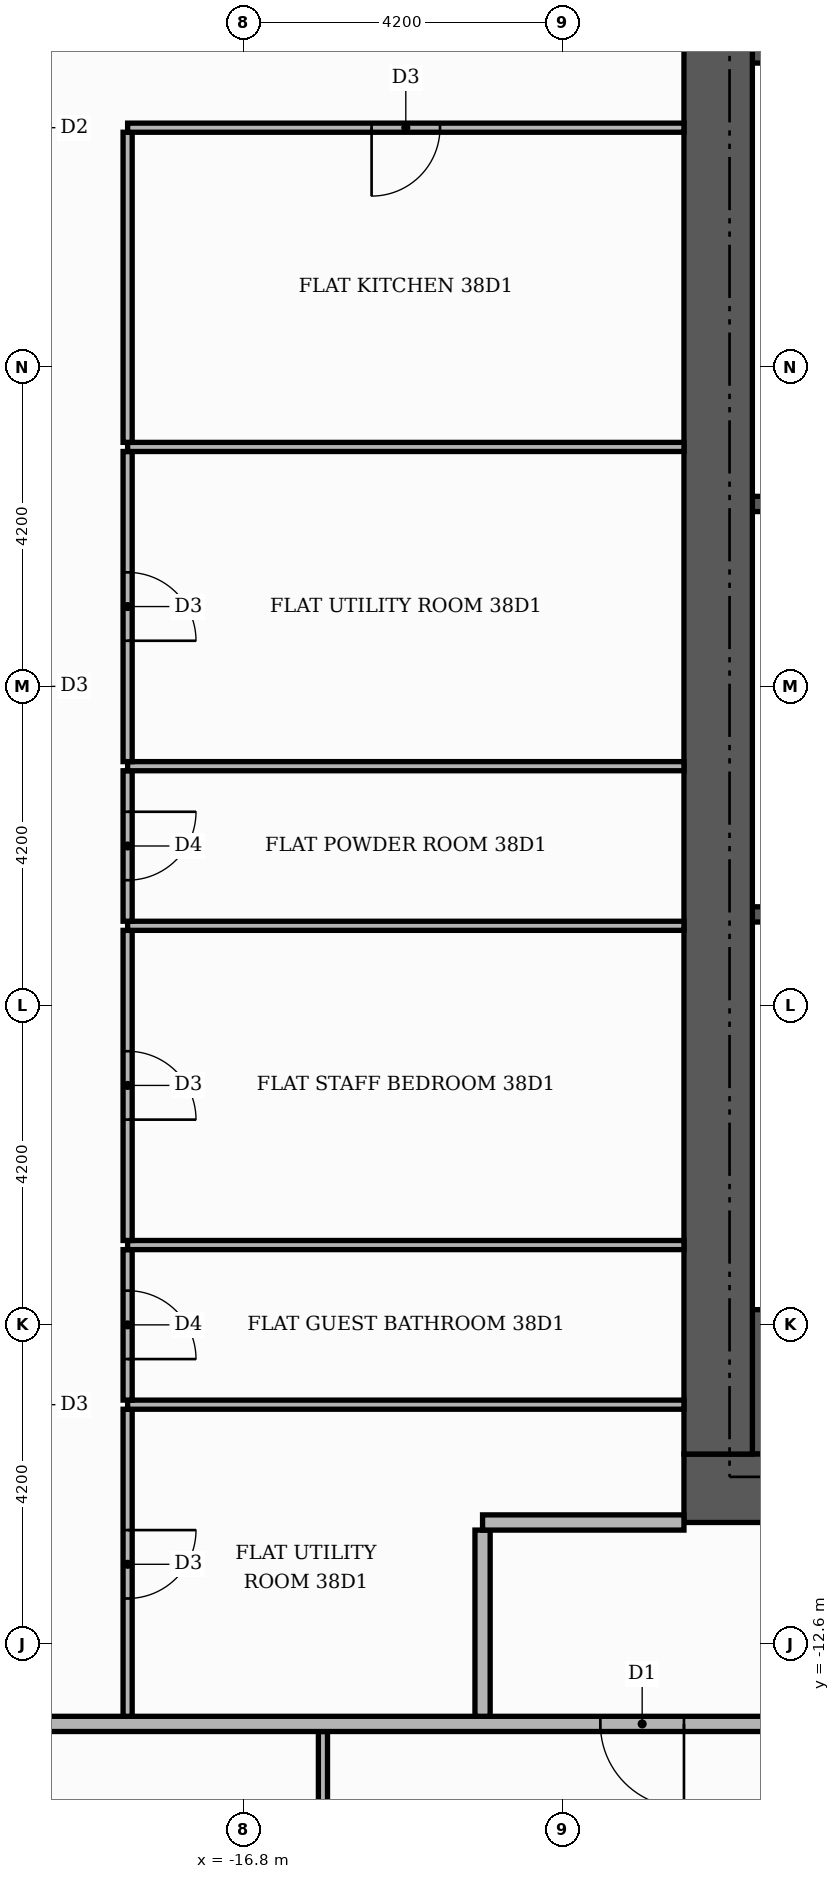
"""IFC4 building model, lengths in metres.
Left out: names, types, materials, properties, quantities, classifications, styles, units other than length and angle.
Written with IfcOpenShell. Run it as: python <this file> out.ifc"""

import sys

from ifc_helpers import new_model, si_unit, direction, frame, frame_2d, origin, place, context, subcontext, project, spatial, rectangle, extrude, element, fill, save


model = new_model("IFC4")
c1 = context("Model", 3, precision=1e-05, world=origin(), true_north=direction((0.0, 1.0)))
c2 = subcontext(c1, "Body", "Model", "MODEL_VIEW")
j1 = project(units=[si_unit("LENGTHUNIT", "METRE"), si_unit("PLANEANGLEUNIT", "RADIAN")], contexts=[c1])
p1 = place(None, origin())
s1 = spatial("IfcSite", under=j1, at=p1, CompositionType="ELEMENT")
p2 = place(p1, origin())
s2 = spatial("IfcBuilding", under=s1, at=p2, CompositionType="ELEMENT")
p3 = place(p2, frame((0.0, 0.0, 161.1)))
s3 = spatial("IfcBuildingStorey", under=s2, at=p3, CompositionType="ELEMENT", Elevation=161.1)
for number, where, z_axis, x_axis in (
    (1, (-10.1, -9.15, 0.0), (0.0, 0.0, 1.0), (1.0, 0.0, 0.0)),
    (2, (-10.1, 9.15, 0.0), (0.0, 0.0, 1.0), (1.0, 0.0, 0.0)),
):
    element("IfcWall", number, at=place(p3, frame(where, z_axis=z_axis, x_axis=x_axis)), inside=s3, PredefinedType="SHEAR", context=c2, shape_type="SweptSolid", body=[
        extrude(rectangle(XDim=4.6, YDim=1.9, at=frame_2d((2.3, 0.0))), origin(), (0.0, 0.0, 1.0), 3.48),
    ])
for number, where, z_axis, x_axis in (
    (3, (-10.1, -3.0, 0.0), (0.0, 0.0, 1.0), (1.0, 0.0, 0.0)),
    (4, (-10.1, 2.4, 0.0), (0.0, 0.0, 1.0), (1.0, 0.0, 0.0)),
):
    element("IfcWall", number, at=place(p3, frame(where, z_axis=z_axis, x_axis=x_axis)), inside=s3, PredefinedType="SHEAR", context=c2, shape_type="SweptSolid", body=[
        extrude(rectangle(XDim=0.9, YDim=0.2, at=frame_2d((0.45, 0.0))), origin(), (0.0, 0.0, 1.0), 3.48),
    ])
p4 = place(p3, frame((-11.0, -10.55, 0.0), z_axis=(0.0, 0.0, 1.0), x_axis=(1.0, 0.0, 0.0)))
e5 = element("IfcWall", 5, at=p4, inside=s3, PredefinedType="SHEAR", context=c2, shape_type="SweptSolid", body=[
    extrude(rectangle(XDim=22.0, YDim=0.9, at=frame_2d((11.0, 0.0))), origin(), (0.0, 0.0, 1.0), 3.48),
])
p5 = place(p4, frame((7.4, 0.0, 0.0)))
e6 = element("IfcOpeningElement", 6, at=p5, cuts=e5, PredefinedType="OPENING", context=c2, shape_type="SweptSolid", body=[
    extrude(rectangle(XDim=1.8, YDim=2.2, at=frame_2d((0.9, 1.1))), frame((0.0, 0.46, 0.0), z_axis=(0.0, -1.0, 0.0), x_axis=(1.0, 0.0, 0.0)), (0.0, 0.0, 1.0), 0.92),
])
p6 = place(p3, frame((-10.55, -10.1, 0.0), z_axis=(0.0, 0.0, 1.0), x_axis=(0.0, 1.0, 0.0)))
e7 = element("IfcWall", 7, at=p6, inside=s3, PredefinedType="SHEAR", context=c2, shape_type="SweptSolid", body=[
    extrude(rectangle(XDim=20.2, YDim=0.9, at=frame_2d((10.1, 0.0))), origin(), (0.0, 0.0, 1.0), 3.48),
])
p7 = place(p3, frame((-15.75, -20.06, 0.0), z_axis=(0.0, 0.0, 1.0), x_axis=(0.0, 1.0, 0.0)))
e8 = element("IfcWall", 8, at=p7, inside=s3, PredefinedType="PARTITIONING", context=c2, shape_type="SweptSolid", body=[
    extrude(rectangle(XDim=6.31, YDim=0.12, at=frame_2d((3.155, 0.0))), origin(), (0.0, 0.0, 1.0), 3.48),
])
p8 = place(p7, frame((2.675, 0.0, 0.0)))
e9 = element("IfcOpeningElement", 9, at=p8, cuts=e8, PredefinedType="OPENING", context=c2, shape_type="SweptSolid", body=[
    extrude(rectangle(XDim=1.0, YDim=2.1, at=frame_2d((0.5, 1.05))), frame((0.0, 0.07, 0.0), z_axis=(0.0, -1.0, 0.0), x_axis=(1.0, 0.0, 0.0)), (0.0, 0.0, 1.0), 0.14),
])
p9 = place(p3, frame((-25.42, -13.65, 0.0), z_axis=(0.0, 0.0, 1.0), x_axis=(1.0, 0.0, 0.0)))
e10 = element("IfcWall", 10, at=p9, inside=s3, PredefinedType="PARTITIONING", context=c2, shape_type="SweptSolid", body=[
    extrude(rectangle(XDim=39.07, YDim=0.2, at=frame_2d((19.535, 0.0))), origin(), (0.0, 0.0, 1.0), 3.48),
])
p10 = place(p9, frame((13.32, 0.0, 0.0)))
e11 = element("IfcOpeningElement", 11, at=p10, cuts=e10, PredefinedType="OPENING", context=c2, shape_type="SweptSolid", body=[
    extrude(rectangle(XDim=1.1, YDim=2.4, at=frame_2d((0.55, 1.2))), frame((0.0, 0.11, 0.0), z_axis=(0.0, -1.0, 0.0), x_axis=(1.0, 0.0, 0.0)), (0.0, 0.0, 1.0), 0.22),
])
p11 = place(p9, frame((21.72, 0.0, 0.0)))
e12 = element("IfcOpeningElement", 12, at=p11, cuts=e10, PredefinedType="OPENING", context=c2, shape_type="SweptSolid", body=[
    extrude(rectangle(XDim=1.1, YDim=2.4, at=frame_2d((0.55, 1.2))), frame((0.0, 0.11, 0.0), z_axis=(0.0, -1.0, 0.0), x_axis=(1.0, 0.0, 0.0)), (0.0, 0.0, 1.0), 0.22),
])
p12 = place(p3, frame((-18.32, -13.55, 0.0), z_axis=(0.0, 0.0, 1.0), x_axis=(0.0, 1.0, 0.0)))
e13 = element("IfcWall", 13, at=p12, inside=s3, PredefinedType="PARTITIONING", context=c2, shape_type="SweptSolid", body=[
    extrude(rectangle(XDim=4.04, YDim=0.12, at=frame_2d((2.02, 0.0))), origin(), (0.0, 0.0, 1.0), 3.48),
])
p13 = place(p12, frame((1.55, 0.0, 0.0)))
e14 = element("IfcOpeningElement", 14, at=p13, cuts=e13, PredefinedType="OPENING", context=c2, shape_type="SweptSolid", body=[
    extrude(rectangle(XDim=0.9, YDim=2.1, at=frame_2d((0.45, 1.05))), frame((0.0, 0.07, 0.0), z_axis=(0.0, -1.0, 0.0), x_axis=(1.0, 0.0, 0.0)), (0.0, 0.0, 1.0), 0.14),
])
p14 = place(p3, frame((-13.65, -13.55, 0.0), z_axis=(0.0, 0.0, 1.0), x_axis=(0.0, 1.0, 0.0)))
e15 = element("IfcWall", 15, at=p14, inside=s3, PredefinedType="PARTITIONING", context=c2, shape_type="SweptSolid", body=[
    extrude(rectangle(XDim=2.45, YDim=0.2, at=frame_2d((1.225, 0.0))), origin(), (0.0, 0.0, 1.0), 3.48),
])
p15 = place(p3, frame((-13.65, -11.0, 0.0), z_axis=(0.0, 0.0, 1.0), x_axis=(1.0, 0.0, 0.0)))
e16 = element("IfcWall", 16, at=p15, inside=s3, PredefinedType="PARTITIONING", context=c2, shape_type="SweptSolid", body=[
    extrude(rectangle(XDim=2.65, YDim=0.2, at=frame_2d((1.325, 0.0))), origin(), (0.0, 0.0, 1.0), 3.48),
])
p16 = place(p3, frame((-18.32, -9.45, 0.0), z_axis=(0.0, 0.0, 1.0), x_axis=(1.0, 0.0, 0.0)))
e17 = element("IfcWall", 17, at=p16, inside=s3, PredefinedType="PARTITIONING", context=c2, shape_type="SweptSolid", body=[
    extrude(rectangle(XDim=7.32, YDim=0.12, at=frame_2d((3.66, 0.0))), origin(), (0.0, 0.0, 1.0), 3.48),
])
p17 = place(p3, frame((-18.32, -9.39, 0.0), z_axis=(0.0, 0.0, 1.0), x_axis=(0.0, 1.0, 0.0)))
e18 = element("IfcWall", 18, at=p17, inside=s3, PredefinedType="PARTITIONING", context=c2, shape_type="SweptSolid", body=[
    extrude(rectangle(XDim=1.98, YDim=0.12, at=frame_2d((0.99, 0.0))), origin(), (0.0, 0.0, 1.0), 3.48),
])
p18 = place(p17, frame((0.54, 0.0, 0.0)))
e19 = element("IfcOpeningElement", 19, at=p18, cuts=e18, PredefinedType="OPENING", context=c2, shape_type="SweptSolid", body=[
    extrude(rectangle(XDim=0.9, YDim=2.1, at=frame_2d((0.45, 1.05))), frame((0.0, 0.07, 0.0), z_axis=(0.0, -1.0, 0.0), x_axis=(1.0, 0.0, 0.0)), (0.0, 0.0, 1.0), 0.14),
])
p19 = place(p3, frame((-18.32, -7.35, 0.0), z_axis=(0.0, 0.0, 1.0), x_axis=(1.0, 0.0, 0.0)))
e20 = element("IfcWall", 20, at=p19, inside=s3, PredefinedType="PARTITIONING", context=c2, shape_type="SweptSolid", body=[
    extrude(rectangle(XDim=7.32, YDim=0.12, at=frame_2d((3.66, 0.0))), origin(), (0.0, 0.0, 1.0), 3.48),
])
p20 = place(p3, frame((-18.32, -7.29, 0.0), z_axis=(0.0, 0.0, 1.0), x_axis=(0.0, 1.0, 0.0)))
e21 = element("IfcWall", 21, at=p20, inside=s3, PredefinedType="PARTITIONING", context=c2, shape_type="SweptSolid", body=[
    extrude(rectangle(XDim=4.08, YDim=0.12, at=frame_2d((2.04, 0.0))), origin(), (0.0, 0.0, 1.0), 3.48),
])
p21 = place(p20, frame((1.59, 0.0, 0.0)))
e22 = element("IfcOpeningElement", 22, at=p21, cuts=e21, PredefinedType="OPENING", context=c2, shape_type="SweptSolid", body=[
    extrude(rectangle(XDim=0.9, YDim=2.1, at=frame_2d((0.45, 1.05))), frame((0.0, 0.07, 0.0), z_axis=(0.0, -1.0, 0.0), x_axis=(1.0, 0.0, 0.0)), (0.0, 0.0, 1.0), 0.14),
])
p22 = place(p3, frame((-18.32, -3.15, 0.0), z_axis=(0.0, 0.0, 1.0), x_axis=(1.0, 0.0, 0.0)))
e23 = element("IfcWall", 23, at=p22, inside=s3, PredefinedType="PARTITIONING", context=c2, shape_type="SweptSolid", body=[
    extrude(rectangle(XDim=7.32, YDim=0.12, at=frame_2d((3.66, 0.0))), origin(), (0.0, 0.0, 1.0), 3.48),
])
p23 = place(p3, frame((-18.32, -3.09, 0.0), z_axis=(0.0, 0.0, 1.0), x_axis=(0.0, 1.0, 0.0)))
e24 = element("IfcWall", 24, at=p23, inside=s3, PredefinedType="PARTITIONING", context=c2, shape_type="SweptSolid", body=[
    extrude(rectangle(XDim=1.98, YDim=0.12, at=frame_2d((0.99, 0.0))), origin(), (0.0, 0.0, 1.0), 3.48),
])
p24 = place(p23, frame((0.54, 0.0, 0.0)))
e25 = element("IfcOpeningElement", 25, at=p24, cuts=e24, PredefinedType="OPENING", context=c2, shape_type="SweptSolid", body=[
    extrude(rectangle(XDim=0.9, YDim=2.1, at=frame_2d((0.45, 1.05))), frame((0.0, 0.07, 0.0), z_axis=(0.0, -1.0, 0.0), x_axis=(1.0, 0.0, 0.0)), (0.0, 0.0, 1.0), 0.14),
])
p25 = place(p3, frame((-18.32, -1.05, 0.0), z_axis=(0.0, 0.0, 1.0), x_axis=(1.0, 0.0, 0.0)))
e26 = element("IfcWall", 26, at=p25, inside=s3, PredefinedType="PARTITIONING", context=c2, shape_type="SweptSolid", body=[
    extrude(rectangle(XDim=7.32, YDim=0.12, at=frame_2d((3.66, 0.0))), origin(), (0.0, 0.0, 1.0), 3.48),
])
p26 = place(p3, frame((-18.32, -0.99, 0.0), z_axis=(0.0, 0.0, 1.0), x_axis=(0.0, 1.0, 0.0)))
e27 = element("IfcWall", 27, at=p26, inside=s3, PredefinedType="PARTITIONING", context=c2, shape_type="SweptSolid", body=[
    extrude(rectangle(XDim=4.08, YDim=0.12, at=frame_2d((2.04, 0.0))), origin(), (0.0, 0.0, 1.0), 3.48),
])
p27 = place(p26, frame((1.59, 0.0, 0.0)))
e28 = element("IfcOpeningElement", 28, at=p27, cuts=e27, PredefinedType="OPENING", context=c2, shape_type="SweptSolid", body=[
    extrude(rectangle(XDim=0.9, YDim=2.1, at=frame_2d((0.45, 1.05))), frame((0.0, 0.07, 0.0), z_axis=(0.0, -1.0, 0.0), x_axis=(1.0, 0.0, 0.0)), (0.0, 0.0, 1.0), 0.14),
])
p28 = place(p3, frame((-18.32, 3.15, 0.0), z_axis=(0.0, 0.0, 1.0), x_axis=(1.0, 0.0, 0.0)))
e29 = element("IfcWall", 29, at=p28, inside=s3, PredefinedType="PARTITIONING", context=c2, shape_type="SweptSolid", body=[
    extrude(rectangle(XDim=7.32, YDim=0.12, at=frame_2d((3.66, 0.0))), origin(), (0.0, 0.0, 1.0), 3.48),
])
p29 = place(p3, frame((-18.32, 3.21, 0.0), z_axis=(0.0, 0.0, 1.0), x_axis=(0.0, 1.0, 0.0)))
e30 = element("IfcWall", 30, at=p29, inside=s3, PredefinedType="PARTITIONING", context=c2, shape_type="SweptSolid", body=[
    extrude(rectangle(XDim=4.08, YDim=0.12, at=frame_2d((2.04, 0.0))), origin(), (0.0, 0.0, 1.0), 3.48),
])
p30 = place(p3, frame((-18.32, 7.35, 0.0), z_axis=(0.0, 0.0, 1.0), x_axis=(1.0, 0.0, 0.0)))
e31 = element("IfcWall", 31, at=p30, inside=s3, PredefinedType="PARTITIONING", context=c2, shape_type="SweptSolid", body=[
    extrude(rectangle(XDim=7.32, YDim=0.12, at=frame_2d((3.66, 0.0))), origin(), (0.0, 0.0, 1.0), 3.48),
])
p31 = place(p30, frame((3.21, 0.0, 0.0)))
e32 = element("IfcOpeningElement", 32, at=p31, cuts=e31, PredefinedType="OPENING", context=c2, shape_type="SweptSolid", body=[
    extrude(rectangle(XDim=0.9, YDim=2.1, at=frame_2d((0.45, 1.05))), frame((0.0, 0.07, 0.0), z_axis=(0.0, -1.0, 0.0), x_axis=(1.0, 0.0, 0.0)), (0.0, 0.0, 1.0), 0.14),
])
p32 = place(p10, frame((1.1, 0.0, 0.0), z_axis=(0.0, 0.0, 1.0), x_axis=(-1.0, 0.0, 0.0)))
e33 = element("IfcDoor", 33, at=p32, inside=s3, OperationType="SINGLE_SWING_RIGHT", PredefinedType="DOOR", context=c2, shape_type="SweptSolid", body=[
    extrude(rectangle(XDim=1.1, YDim=2.4, at=frame_2d((0.55, 1.2))), frame((0.0, 0.025, 0.0), z_axis=(0.0, -1.0, 0.0), x_axis=(1.0, 0.0, 0.0)), (0.0, 0.0, 1.0), 0.05),
])
fill(e11, e33)
p33 = place(p31, frame((0.9, 0.0, 0.0), z_axis=(0.0, 0.0, 1.0), x_axis=(-1.0, 0.0, 0.0)))
e34 = element("IfcDoor", 34, at=p33, inside=s3, OperationType="SINGLE_SWING_LEFT", PredefinedType="DOOR", context=c2, shape_type="SweptSolid", body=[
    extrude(rectangle(XDim=0.9, YDim=2.1, at=frame_2d((0.45, 1.05))), frame((0.0, 0.025, 0.0), z_axis=(0.0, -1.0, 0.0), x_axis=(1.0, 0.0, 0.0)), (0.0, 0.0, 1.0), 0.05),
])
fill(e32, e34)
p34 = place(p27, frame((0.9, 0.0, 0.0), z_axis=(0.0, 0.0, 1.0), x_axis=(-1.0, 0.0, 0.0)))
e35 = element("IfcDoor", 35, at=p34, inside=s3, OperationType="SINGLE_SWING_LEFT", PredefinedType="DOOR", context=c2, shape_type="SweptSolid", body=[
    extrude(rectangle(XDim=0.9, YDim=2.1, at=frame_2d((0.45, 1.05))), frame((0.0, 0.025, 0.0), z_axis=(0.0, -1.0, 0.0), x_axis=(1.0, 0.0, 0.0)), (0.0, 0.0, 1.0), 0.05),
])
fill(e28, e35)
p35 = place(p24, frame((0.9, 0.0, 0.0), z_axis=(0.0, 0.0, 1.0), x_axis=(-1.0, 0.0, 0.0)))
e36 = element("IfcDoor", 36, at=p35, inside=s3, OperationType="SINGLE_SWING_RIGHT", PredefinedType="DOOR", context=c2, shape_type="SweptSolid", body=[
    extrude(rectangle(XDim=0.9, YDim=2.1, at=frame_2d((0.45, 1.05))), frame((0.0, 0.025, 0.0), z_axis=(0.0, -1.0, 0.0), x_axis=(1.0, 0.0, 0.0)), (0.0, 0.0, 1.0), 0.05),
])
fill(e25, e36)
p36 = place(p21, frame((0.9, 0.0, 0.0), z_axis=(0.0, 0.0, 1.0), x_axis=(-1.0, 0.0, 0.0)))
e37 = element("IfcDoor", 37, at=p36, inside=s3, OperationType="SINGLE_SWING_LEFT", PredefinedType="DOOR", context=c2, shape_type="SweptSolid", body=[
    extrude(rectangle(XDim=0.9, YDim=2.1, at=frame_2d((0.45, 1.05))), frame((0.0, 0.025, 0.0), z_axis=(0.0, -1.0, 0.0), x_axis=(1.0, 0.0, 0.0)), (0.0, 0.0, 1.0), 0.05),
])
fill(e22, e37)
p37 = place(p18, frame((0.9, 0.0, 0.0), z_axis=(0.0, 0.0, 1.0), x_axis=(-1.0, 0.0, 0.0)))
e38 = element("IfcDoor", 38, at=p37, inside=s3, OperationType="SINGLE_SWING_LEFT", PredefinedType="DOOR", context=c2, shape_type="SweptSolid", body=[
    extrude(rectangle(XDim=0.9, YDim=2.1, at=frame_2d((0.45, 1.05))), frame((0.0, 0.025, 0.0), z_axis=(0.0, -1.0, 0.0), x_axis=(1.0, 0.0, 0.0)), (0.0, 0.0, 1.0), 0.05),
])
fill(e19, e38)
p38 = place(p13, frame((0.9, 0.0, 0.0), z_axis=(0.0, 0.0, 1.0), x_axis=(-1.0, 0.0, 0.0)))
e39 = element("IfcDoor", 39, at=p38, inside=s3, OperationType="SINGLE_SWING_RIGHT", PredefinedType="DOOR", context=c2, shape_type="SweptSolid", body=[
    extrude(rectangle(XDim=0.9, YDim=2.1, at=frame_2d((0.45, 1.05))), frame((0.0, 0.025, 0.0), z_axis=(0.0, -1.0, 0.0), x_axis=(1.0, 0.0, 0.0)), (0.0, 0.0, 1.0), 0.05),
])
fill(e14, e39)
save(model, sys.argv[1])
